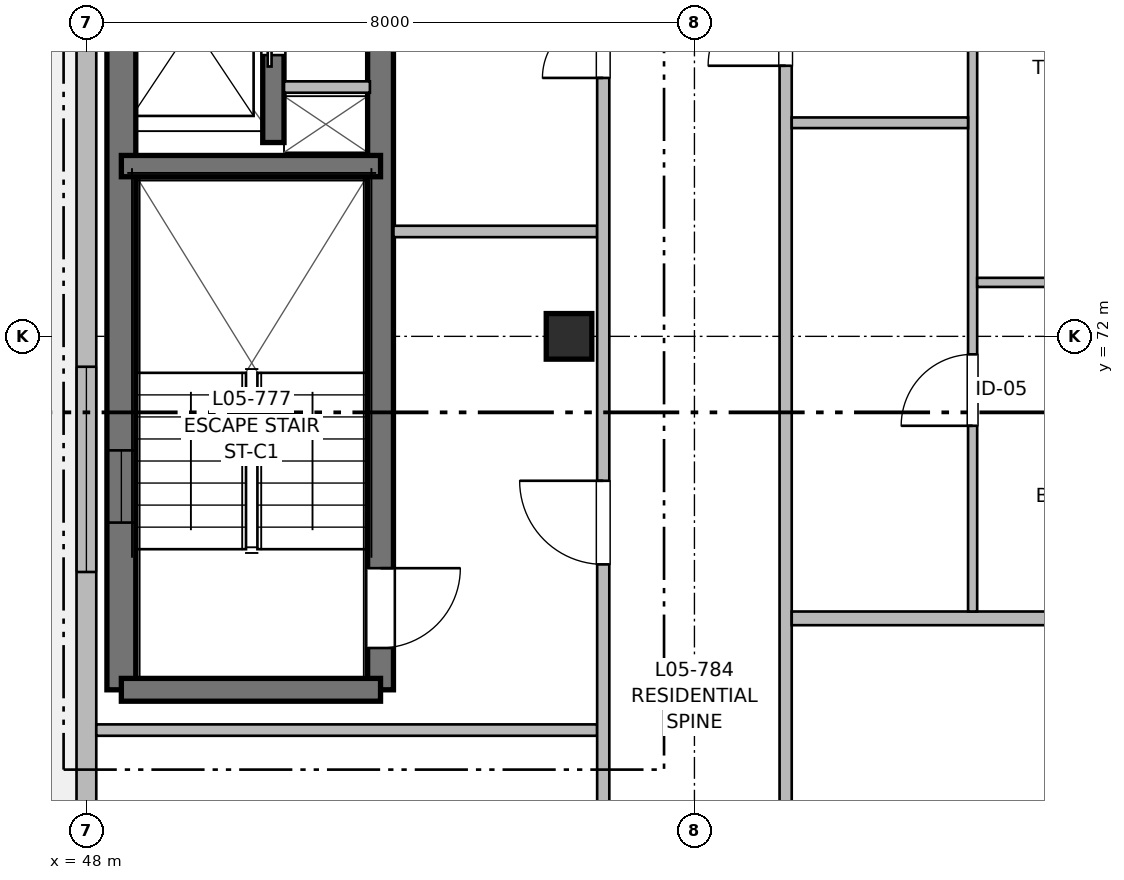
"""IFC4 building model, lengths in metres.
Left out: names, types, materials, properties, quantities, classifications, styles, units other than length and angle.
Written with IfcOpenShell. Run it as: python <this file> out.ifc"""

import sys

from ifc_helpers import new_model, si_unit, direction, frame, frame_2d, origin, origin_2d, place, context, subcontext, project, spatial, rectangle, extrude, element, fill, save


model = new_model("IFC4")
c1 = context("Model", 3, precision=1e-05, world=origin(), true_north=direction((0.0, 1.0)))
c2 = subcontext(c1, "Body", "Model", "MODEL_VIEW")
j1 = project(units=[si_unit("LENGTHUNIT", "METRE"), si_unit("PLANEANGLEUNIT", "RADIAN")], contexts=[c1])
p1 = place(None, origin())
s1 = spatial("IfcSite", under=j1, at=p1, CompositionType="ELEMENT")
p2 = place(p1, origin())
s2 = spatial("IfcBuilding", under=s1, at=p2, CompositionType="ELEMENT")
p3 = place(p2, frame((0.0, 0.0, 16.96)))
s3 = spatial("IfcBuildingStorey", under=s2, at=p3, CompositionType="ELEMENT", Elevation=16.96)
p4 = place(p3, frame((54.35, 72.0, 0.0), z_axis=(0.0, 0.0, 1.0), x_axis=(1.0, 0.0, 0.0)))
e1 = element("IfcColumn", 1, at=p4, inside=s3, PredefinedType="COLUMN", context=c2, shape_type="SweptSolid", body=[
    extrude(rectangle(XDim=0.6, YDim=0.6, at=origin_2d()), origin(), (0.0, 0.0, 1.0), 3.2),
])
p5 = place(p3, frame((48.46, 67.35, 0.0), z_axis=(0.0, 0.0, 1.0), x_axis=(0.0, 1.0, 0.0)))
e2 = element("IfcWall", 2, at=p5, inside=s3, PredefinedType="SHEAR", context=c2, shape_type="SweptSolid", body=[
    extrude(rectangle(XDim=12.45, YDim=0.38, at=frame_2d((6.225, 0.0))), origin(), (0.0, 0.0, 1.0), 3.2),
])
p6 = place(p5, frame((2.2, 0.0, 0.97)))
e3 = element("IfcOpeningElement", 3, at=p6, cuts=e2, PredefinedType="OPENING", context=c2, shape_type="SweptSolid", body=[
    extrude(rectangle(XDim=0.95, YDim=1.25, at=frame_2d((0.475, 0.625))), frame((0.0, 0.2, 0.0), z_axis=(0.0, -1.0, 0.0), x_axis=(1.0, 0.0, 0.0)), (0.0, 0.0, 1.0), 0.4),
])
p7 = place(p3, frame((51.87, 79.8, 0.0), z_axis=(0.0, 0.0, 1.0), x_axis=(0.0, -1.0, 0.0)))
e4 = element("IfcWall", 4, at=p7, inside=s3, PredefinedType="SHEAR", context=c2, shape_type="SweptSolid", body=[
    extrude(rectangle(XDim=12.45, YDim=0.34, at=frame_2d((6.225, 0.0))), origin(), (0.0, 0.0, 1.0), 3.2),
])
p8 = place(p7, frame((10.85, 0.0, 0.0)))
e5 = element("IfcOpeningElement", 5, at=p8, cuts=e4, PredefinedType="OPENING", context=c2, shape_type="SweptSolid", body=[
    extrude(rectangle(XDim=1.05, YDim=2.15, at=frame_2d((0.525, 1.075))), frame((0.0, 0.18, 0.0), z_axis=(0.0, -1.0, 0.0), x_axis=(1.0, 0.0, 0.0)), (0.0, 0.0, 1.0), 0.36),
])
p9 = place(p3, frame((51.87, 67.35, 0.0), z_axis=(0.0, 0.0, 1.0), x_axis=(-1.0, 0.0, 0.0)))
e6 = element("IfcWall", 6, at=p9, inside=s3, PredefinedType="SHEAR", context=c2, shape_type="SweptSolid", body=[
    extrude(rectangle(XDim=3.41, YDim=0.3, at=frame_2d((1.705, 0.0))), origin(), (0.0, 0.0, 1.0), 3.2),
])
p10 = place(p3, frame((48.46, 74.24, 0.0), z_axis=(0.0, 0.0, 1.0), x_axis=(1.0, 0.0, 0.0)))
e7 = element("IfcWall", 7, at=p10, inside=s3, PredefinedType="SHEAR", context=c2, shape_type="SweptSolid", body=[
    extrude(rectangle(XDim=3.41, YDim=0.28, at=frame_2d((1.705, 0.0))), origin(), (0.0, 0.0, 1.0), 3.2),
])
p11 = place(p3, frame((50.46, 74.55, 0.0), z_axis=(0.0, 0.0, 1.0), x_axis=(0.0, 1.0, 0.0)))
e8 = element("IfcWall", 8, at=p11, inside=s3, PredefinedType="SHEAR", context=c2, shape_type="SweptSolid", body=[
    extrude(rectangle(XDim=5.25, YDim=0.28, at=frame_2d((2.625, 0.0))), origin(), (0.0, 0.0, 1.0), 3.2),
])
p12 = place(p11, frame((1.15, 0.0, 0.0)))
e9 = element("IfcOpeningElement", 9, at=p12, cuts=e8, PredefinedType="OPENING", context=c2, shape_type="SweptSolid", body=[
    extrude(rectangle(XDim=1.0, YDim=2.15, at=frame_2d((0.5, 1.075))), frame((0.0, 0.15, 0.0), z_axis=(0.0, -1.0, 0.0), x_axis=(1.0, 0.0, 0.0)), (0.0, 0.0, 1.0), 0.3),
])
p13 = place(p11, frame((3.85, 0.0, 0.0)))
e10 = element("IfcOpeningElement", 10, at=p13, cuts=e8, PredefinedType="OPENING", context=c2, shape_type="SweptSolid", body=[
    extrude(rectangle(XDim=0.9, YDim=2.15, at=frame_2d((0.45, 1.075))), frame((0.0, 0.15, 0.0), z_axis=(0.0, -1.0, 0.0), x_axis=(1.0, 0.0, 0.0)), (0.0, 0.0, 1.0), 0.3),
])
p14 = place(p3, frame((50.6, 75.28, 0.0), z_axis=(0.0, 0.0, 1.0), x_axis=(1.0, 0.0, 0.0)))
e11 = element("IfcWall", 11, at=p14, inside=s3, PredefinedType="PARTITIONING", context=c2, shape_type="SweptSolid", body=[
    extrude(rectangle(XDim=1.13, YDim=0.15, at=frame_2d((0.565, 0.0))), origin(), (0.0, 0.0, 1.0), 2.95),
])
p15 = place(p3, frame((48.0, 56.0, 0.0), z_axis=(0.0, 0.0, 1.0), x_axis=(0.0, 1.0, 0.0)))
e12 = element("IfcWall", 12, at=p15, inside=s3, PredefinedType="SOLIDWALL", context=c2, shape_type="SweptSolid", body=[
    extrude(rectangle(XDim=38.0, YDim=0.26, at=frame_2d((19.0, 0.0))), origin(), (0.0, 0.0, 1.0), 2.98),
])
p16 = place(p15, frame((4.15, 0.0, 0.0)))
e13 = element("IfcOpeningElement", 13, at=p16, cuts=e12, PredefinedType="OPENING", context=c2, shape_type="SweptSolid", body=[
    extrude(rectangle(XDim=1.2, YDim=2.2, at=frame_2d((0.6, 1.1))), frame((0.0, 0.14, 0.0), z_axis=(0.0, -1.0, 0.0), x_axis=(1.0, 0.0, 0.0)), (0.0, 0.0, 1.0), 0.28),
])
p17 = place(p15, frame((6.05, 0.0, 0.72)))
e14 = element("IfcOpeningElement", 14, at=p17, cuts=e12, PredefinedType="OPENING", context=c2, shape_type="SweptSolid", body=[
    extrude(rectangle(XDim=1.68, YDim=1.5, at=frame_2d((0.84, 0.75))), frame((0.0, 0.14, 0.0), z_axis=(0.0, -1.0, 0.0), x_axis=(1.0, 0.0, 0.0)), (0.0, 0.0, 1.0), 0.28),
])
p18 = place(p15, frame((12.9, 0.0, 0.47)))
e15 = element("IfcOpeningElement", 15, at=p18, cuts=e12, PredefinedType="OPENING", context=c2, shape_type="SweptSolid", body=[
    extrude(rectangle(XDim=2.7, YDim=1.75, at=frame_2d((1.35, 0.875))), frame((0.0, 0.14, 0.0), z_axis=(0.0, -1.0, 0.0), x_axis=(1.0, 0.0, 0.0)), (0.0, 0.0, 1.0), 0.28),
])
p19 = place(p15, frame((24.2, 0.0, 0.72)))
e16 = element("IfcOpeningElement", 16, at=p19, cuts=e12, PredefinedType="OPENING", context=c2, shape_type="SweptSolid", body=[
    extrude(rectangle(XDim=1.7, YDim=1.5, at=frame_2d((0.85, 0.75))), frame((0.0, 0.14, 0.0), z_axis=(0.0, -1.0, 0.0), x_axis=(1.0, 0.0, 0.0)), (0.0, 0.0, 1.0), 0.28),
])
p20 = place(p15, frame((32.1, 0.0, 0.57)))
e17 = element("IfcOpeningElement", 17, at=p20, cuts=e12, PredefinedType="OPENING", context=c2, shape_type="SweptSolid", body=[
    extrude(rectangle(XDim=2.3, YDim=1.65, at=frame_2d((1.15, 0.825))), frame((0.0, 0.14, 0.0), z_axis=(0.0, -1.0, 0.0), x_axis=(1.0, 0.0, 0.0)), (0.0, 0.0, 1.0), 0.28),
])
p21 = place(p3, frame((48.13, 66.82, 0.0), z_axis=(0.0, 0.0, 1.0), x_axis=(1.0, 0.0, 0.0)))
e18 = element("IfcWall", 18, at=p21, inside=s3, PredefinedType="PARTITIONING", context=c2, shape_type="SweptSolid", body=[
    extrude(rectangle(XDim=6.59, YDim=0.15, at=frame_2d((3.295, 0.0))), origin(), (0.0, 0.0, 1.0), 2.935),
])
p22 = place(p3, frame((52.04, 73.38, 0.0), z_axis=(0.0, 0.0, 1.0), x_axis=(1.0, 0.0, 0.0)))
e19 = element("IfcWall", 19, at=p22, inside=s3, PredefinedType="PARTITIONING", context=c2, shape_type="SweptSolid", body=[
    extrude(rectangle(XDim=2.68, YDim=0.15, at=frame_2d((1.34, 0.0))), origin(), (0.0, 0.0, 1.0), 2.935),
])
p23 = place(p3, frame((54.8, 56.16, 0.0), z_axis=(0.0, 0.0, 1.0), x_axis=(0.0, 1.0, 0.0)))
e20 = element("IfcWall", 20, at=p23, inside=s3, PredefinedType="PARTITIONING", context=c2, shape_type="SweptSolid", body=[
    extrude(rectangle(XDim=50.64, YDim=0.16, at=frame_2d((25.32, 0.0))), origin(), (0.0, 0.0, 1.0), 2.935),
])
p24 = place(p23, frame((12.84, 0.0, 0.0)))
e21 = element("IfcOpeningElement", 21, at=p24, cuts=e20, PredefinedType="OPENING", context=c2, shape_type="SweptSolid", body=[
    extrude(rectangle(XDim=1.1, YDim=2.15, at=frame_2d((0.55, 1.075))), frame((0.0, 0.09, 0.0), z_axis=(0.0, -1.0, 0.0), x_axis=(1.0, 0.0, 0.0)), (0.0, 0.0, 1.0), 0.18),
])
p25 = place(p23, frame((19.24, 0.0, 0.0)))
e22 = element("IfcOpeningElement", 22, at=p25, cuts=e20, PredefinedType="OPENING", context=c2, shape_type="SweptSolid", body=[
    extrude(rectangle(XDim=1.6, YDim=2.15, at=frame_2d((0.8, 1.075))), frame((0.0, 0.09, 0.0), z_axis=(0.0, -1.0, 0.0), x_axis=(1.0, 0.0, 0.0)), (0.0, 0.0, 1.0), 0.18),
])
p26 = place(p23, frame((1.8, 0.0, 0.0)))
e23 = element("IfcOpeningElement", 23, at=p26, cuts=e20, PredefinedType="OPENING", context=c2, shape_type="SweptSolid", body=[
    extrude(rectangle(XDim=0.96, YDim=2.15, at=frame_2d((0.48, 1.075))), frame((0.0, 0.09, 0.0), z_axis=(0.0, -1.0, 0.0), x_axis=(1.0, 0.0, 0.0)), (0.0, 0.0, 1.0), 0.18),
])
p27 = place(p23, frame((32.645, 0.0, 0.0)))
e24 = element("IfcOpeningElement", 24, at=p27, cuts=e20, PredefinedType="OPENING", context=c2, shape_type="SweptSolid", body=[
    extrude(rectangle(XDim=0.98, YDim=2.15, at=frame_2d((0.49, 1.075))), frame((0.0, 0.09, 0.0), z_axis=(0.0, -1.0, 0.0), x_axis=(1.0, 0.0, 0.0)), (0.0, 0.0, 1.0), 0.18),
])
p28 = place(p23, frame((41.255, 0.0, 0.0)))
e25 = element("IfcOpeningElement", 25, at=p28, cuts=e20, PredefinedType="OPENING", context=c2, shape_type="SweptSolid", body=[
    extrude(rectangle(XDim=0.98, YDim=2.15, at=frame_2d((0.49, 1.075))), frame((0.0, 0.09, 0.0), z_axis=(0.0, -1.0, 0.0), x_axis=(1.0, 0.0, 0.0)), (0.0, 0.0, 1.0), 0.18),
])
p29 = place(p3, frame((57.2, 56.16, 0.0), z_axis=(0.0, 0.0, 1.0), x_axis=(0.0, 1.0, 0.0)))
e26 = element("IfcWall", 26, at=p29, inside=s3, PredefinedType="PARTITIONING", context=c2, shape_type="SweptSolid", body=[
    extrude(rectangle(XDim=50.64, YDim=0.16, at=frame_2d((25.32, 0.0))), origin(), (0.0, 0.0, 1.0), 2.935),
])
p30 = place(p29, frame((5.27, 0.0, 0.0)))
e27 = element("IfcOpeningElement", 27, at=p30, cuts=e26, PredefinedType="OPENING", context=c2, shape_type="SweptSolid", body=[
    extrude(rectangle(XDim=1.5, YDim=2.2, at=frame_2d((0.75, 1.1))), frame((0.0, 0.09, 0.0), z_axis=(0.0, -1.0, 0.0), x_axis=(1.0, 0.0, 0.0)), (0.0, 0.0, 1.0), 0.18),
])
p31 = place(p29, frame((19.4, 0.0, 0.0)))
e28 = element("IfcOpeningElement", 28, at=p31, cuts=e26, PredefinedType="OPENING", context=c2, shape_type="SweptSolid", body=[
    extrude(rectangle(XDim=1.02, YDim=2.15, at=frame_2d((0.51, 1.075))), frame((0.0, 0.09, 0.0), z_axis=(0.0, -1.0, 0.0), x_axis=(1.0, 0.0, 0.0)), (0.0, 0.0, 1.0), 0.18),
])
p32 = place(p29, frame((33.1, 0.0, 0.0)))
e29 = element("IfcOpeningElement", 29, at=p32, cuts=e26, PredefinedType="OPENING", context=c2, shape_type="SweptSolid", body=[
    extrude(rectangle(XDim=0.98, YDim=2.15, at=frame_2d((0.49, 1.075))), frame((0.0, 0.09, 0.0), z_axis=(0.0, -1.0, 0.0), x_axis=(1.0, 0.0, 0.0)), (0.0, 0.0, 1.0), 0.18),
])
p33 = place(p29, frame((45.35, 0.0, 0.0)))
e30 = element("IfcOpeningElement", 30, at=p33, cuts=e26, PredefinedType="OPENING", context=c2, shape_type="SweptSolid", body=[
    extrude(rectangle(XDim=0.98, YDim=2.15, at=frame_2d((0.49, 1.075))), frame((0.0, 0.09, 0.0), z_axis=(0.0, -1.0, 0.0), x_axis=(1.0, 0.0, 0.0)), (0.0, 0.0, 1.0), 0.18),
])
p34 = place(p3, frame((57.28, 68.29, 0.0), z_axis=(0.0, 0.0, 1.0), x_axis=(1.0, 0.0, 0.0)))
e31 = element("IfcWall", 31, at=p34, inside=s3, PredefinedType="PARTITIONING", context=c2, shape_type="SweptSolid", body=[
    extrude(rectangle(XDim=6.59, YDim=0.18, at=frame_2d((3.295, 0.0))), origin(), (0.0, 0.0, 1.0), 2.935),
])
p35 = place(p3, frame((59.66, 68.38, 0.0), z_axis=(0.0, 0.0, 1.0), x_axis=(0.0, 1.0, 0.0)))
e32 = element("IfcWall", 32, at=p35, inside=s3, PredefinedType="PARTITIONING", context=c2, shape_type="SweptSolid", body=[
    extrude(rectangle(XDim=13.98, YDim=0.12, at=frame_2d((6.99, 0.0))), origin(), (0.0, 0.0, 1.0), 2.935),
])
p36 = place(p35, frame((2.443, 0.0, 0.0)))
e33 = element("IfcOpeningElement", 33, at=p36, cuts=e32, PredefinedType="OPENING", context=c2, shape_type="SweptSolid", body=[
    extrude(rectangle(XDim=0.94, YDim=2.1, at=frame_2d((0.47, 1.05))), frame((0.0, 0.07, 0.0), z_axis=(0.0, -1.0, 0.0), x_axis=(1.0, 0.0, 0.0)), (0.0, 0.0, 1.0), 0.14),
])
p37 = place(p35, frame((8.544, 0.0, 0.0)))
e34 = element("IfcOpeningElement", 34, at=p37, cuts=e32, PredefinedType="OPENING", context=c2, shape_type="SweptSolid", body=[
    extrude(rectangle(XDim=0.92, YDim=2.1, at=frame_2d((0.46, 1.05))), frame((0.0, 0.07, 0.0), z_axis=(0.0, -1.0, 0.0), x_axis=(1.0, 0.0, 0.0)), (0.0, 0.0, 1.0), 0.14),
])
p38 = place(p3, frame((57.28, 74.81, 0.0), z_axis=(0.0, 0.0, 1.0), x_axis=(1.0, 0.0, 0.0)))
e35 = element("IfcWall", 35, at=p38, inside=s3, PredefinedType="PARTITIONING", context=c2, shape_type="SweptSolid", body=[
    extrude(rectangle(XDim=2.32, YDim=0.14, at=frame_2d((1.16, 0.0))), origin(), (0.0, 0.0, 1.0), 2.935),
])
p39 = place(p3, frame((59.72, 72.71, 0.0), z_axis=(0.0, 0.0, 1.0), x_axis=(1.0, 0.0, 0.0)))
e36 = element("IfcWall", 36, at=p39, inside=s3, PredefinedType="PARTITIONING", context=c2, shape_type="SweptSolid", body=[
    extrude(rectangle(XDim=4.15, YDim=0.12, at=frame_2d((2.075, 0.0))), origin(), (0.0, 0.0, 1.0), 2.935),
])
p40 = place(p39, frame((1.625, 0.0, 0.0)))
e37 = element("IfcOpeningElement", 37, at=p40, cuts=e36, PredefinedType="OPENING", context=c2, shape_type="SweptSolid", body=[
    extrude(rectangle(XDim=0.9, YDim=2.1, at=frame_2d((0.45, 1.05))), frame((0.0, 0.07, 0.0), z_axis=(0.0, -1.0, 0.0), x_axis=(1.0, 0.0, 0.0)), (0.0, 0.0, 1.0), 0.14),
])
p41 = place(p12, origin())
e38 = element("IfcDoor", 38, at=p41, inside=s3, OperationType="SLIDING_TO_LEFT", PredefinedType="DOOR", context=c2, shape_type="SweptSolid", body=[
    extrude(rectangle(XDim=1.0, YDim=2.15, at=frame_2d((0.5, 1.075))), frame((0.0, 0.025, 0.0), z_axis=(0.0, -1.0, 0.0), x_axis=(1.0, 0.0, 0.0)), (0.0, 0.0, 1.0), 0.05),
])
fill(e9, e38)
p42 = place(p8, origin())
e39 = element("IfcDoor", 39, at=p42, inside=s3, OperationType="SINGLE_SWING_LEFT", PredefinedType="DOOR", context=c2, shape_type="SweptSolid", body=[
    extrude(rectangle(XDim=1.05, YDim=2.15, at=frame_2d((0.525, 1.075))), frame((0.0, 0.025, 0.0), z_axis=(0.0, -1.0, 0.0), x_axis=(1.0, 0.0, 0.0)), (0.0, 0.0, 1.0), 0.05),
])
fill(e5, e39)
p43 = place(p6, origin())
e40 = element("IfcWindow", 40, at=p43, inside=s3, PartitioningType="SINGLE_PANEL", PredefinedType="WINDOW", context=c2, shape_type="SweptSolid", body=[
    extrude(rectangle(XDim=0.95, YDim=1.25, at=frame_2d((0.475, 0.625))), frame((0.0, 0.03, 0.0), z_axis=(0.0, -1.0, 0.0), x_axis=(1.0, 0.0, 0.0)), (0.0, 0.0, 1.0), 0.06),
])
fill(e3, e40)
p44 = place(p18, origin())
e41 = element("IfcWindow", 41, at=p44, inside=s3, PartitioningType="SINGLE_PANEL", PredefinedType="WINDOW", context=c2, shape_type="SweptSolid", body=[
    extrude(rectangle(XDim=2.7, YDim=1.75, at=frame_2d((1.35, 0.875))), frame((0.0, 0.03, 0.0), z_axis=(0.0, -1.0, 0.0), x_axis=(1.0, 0.0, 0.0)), (0.0, 0.0, 1.0), 0.06),
])
fill(e15, e41)
p45 = place(p24, origin())
e42 = element("IfcDoor", 42, at=p45, inside=s3, OperationType="SINGLE_SWING_RIGHT", PredefinedType="DOOR", context=c2, shape_type="SweptSolid", body=[
    extrude(rectangle(XDim=1.1, YDim=2.15, at=frame_2d((0.55, 1.075))), frame((0.0, 0.025, 0.0), z_axis=(0.0, -1.0, 0.0), x_axis=(1.0, 0.0, 0.0)), (0.0, 0.0, 1.0), 0.05),
])
fill(e21, e42)
p46 = place(p25, origin())
e43 = element("IfcDoor", 43, at=p46, inside=s3, OperationType="DOUBLE_DOOR_SINGLE_SWING", PredefinedType="DOOR", context=c2, shape_type="SweptSolid", body=[
    extrude(rectangle(XDim=1.6, YDim=2.15, at=frame_2d((0.8, 1.075))), frame((0.0, 0.025, 0.0), z_axis=(0.0, -1.0, 0.0), x_axis=(1.0, 0.0, 0.0)), (0.0, 0.0, 1.0), 0.05),
])
fill(e22, e43)
p47 = place(p36, origin())
e44 = element("IfcDoor", 44, at=p47, inside=s3, OperationType="SINGLE_SWING_LEFT", PredefinedType="DOOR", context=c2, shape_type="SweptSolid", body=[
    extrude(rectangle(XDim=0.94, YDim=2.1, at=frame_2d((0.47, 1.05))), frame((0.0, 0.025, 0.0), z_axis=(0.0, -1.0, 0.0), x_axis=(1.0, 0.0, 0.0)), (0.0, 0.0, 1.0), 0.05),
])
fill(e33, e44)
p48 = place(p31, origin())
e45 = element("IfcDoor", 45, at=p48, inside=s3, OperationType="SINGLE_SWING_LEFT", PredefinedType="DOOR", context=c2, shape_type="SweptSolid", body=[
    extrude(rectangle(XDim=1.02, YDim=2.15, at=frame_2d((0.51, 1.075))), frame((0.0, 0.025, 0.0), z_axis=(0.0, -1.0, 0.0), x_axis=(1.0, 0.0, 0.0)), (0.0, 0.0, 1.0), 0.05),
])
fill(e28, e45)
save(model, sys.argv[1])
